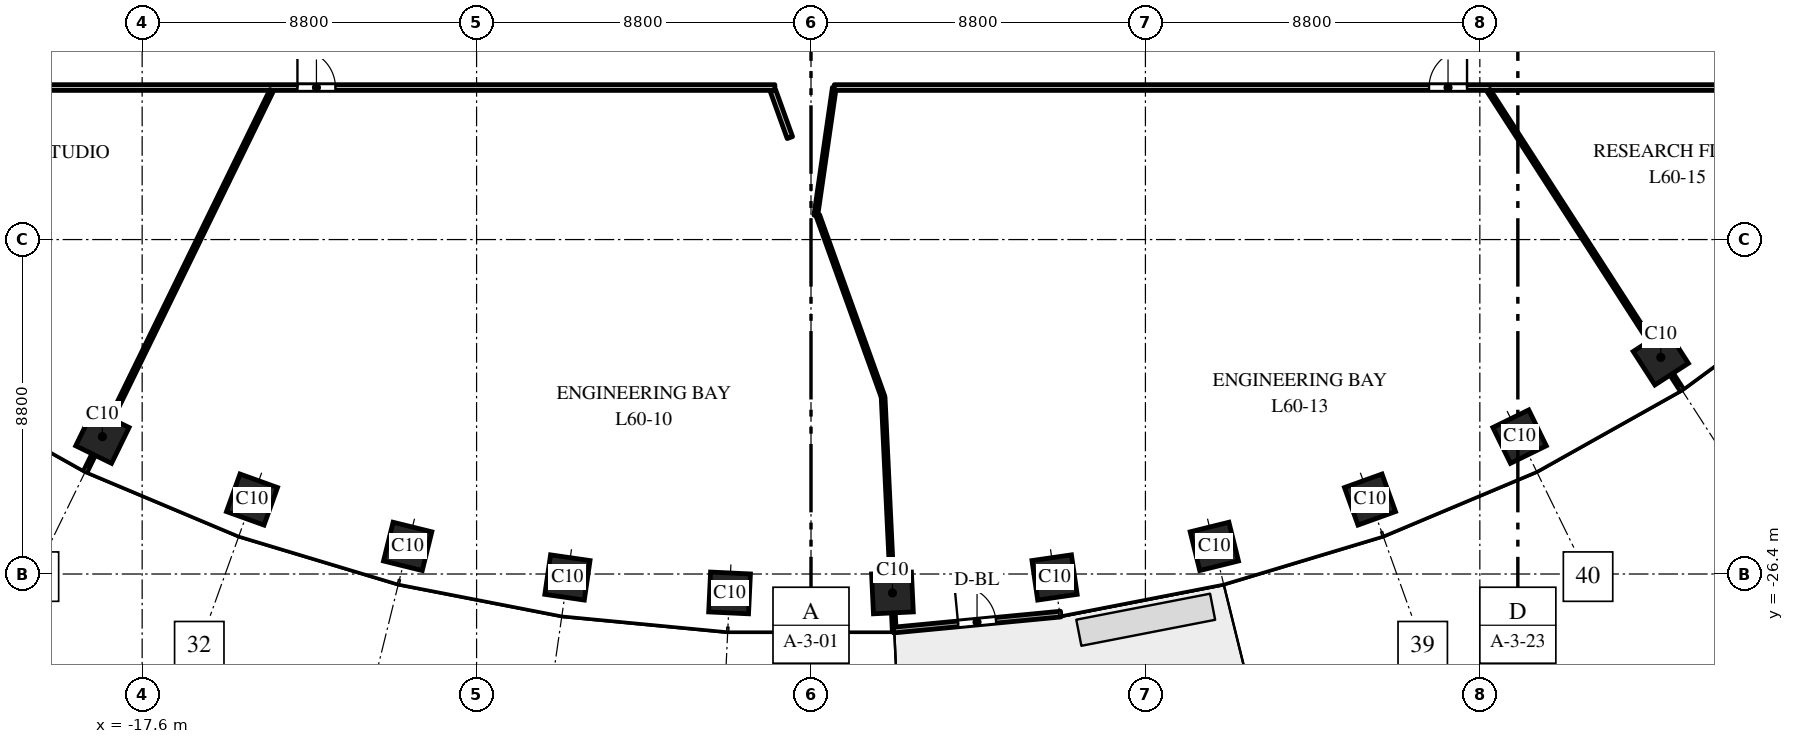
"""IFC4 building model, lengths in metres.
Left out: names, types, materials, properties, quantities, classifications, styles, units other than length and angle.
Written with IfcOpenShell. Run it as: python <this file> out.ifc"""

import sys

from ifc_helpers import new_model, si_unit, direction, frame, frame_2d, origin, origin_2d, place, context, subcontext, project, spatial, rectangle, extrude, element, fill, save


model = new_model("IFC4")
c1 = context("Model", 3, precision=1e-05, world=origin(), true_north=direction((0.0, 1.0)))
c2 = subcontext(c1, "Body", "Model", "MODEL_VIEW")
j1 = project(units=[si_unit("LENGTHUNIT", "METRE"), si_unit("PLANEANGLEUNIT", "RADIAN")], contexts=[c1])
p1 = place(None, origin())
s1 = spatial("IfcSite", under=j1, at=p1, CompositionType="ELEMENT")
p2 = place(p1, origin())
s2 = spatial("IfcBuilding", under=s1, at=p2, CompositionType="ELEMENT")
p3 = place(p2, frame((0.0, 0.0, 281.5)))
s3 = spatial("IfcBuildingStorey", under=s2, at=p3, CompositionType="ELEMENT", Elevation=281.5)
for number, where, z_axis, x_axis in (
    (1, (-18.646, -22.785, 0.0), (0.0, 0.0, 1.0), (0.898, -0.439, 0.0)),
    (2, (-14.709, -24.441, 0.0), (0.0, 0.0, 1.0), (0.941, -0.338, 0.0)),
    (3, (-10.613, -25.674, 0.0), (0.0, 0.0, 1.0), (0.971, -0.24, 0.0)),
    (4, (-6.409, -26.491, 0.0), (0.0, 0.0, 1.0), (0.99, -0.143, 0.0)),
    (5, (-2.143, -26.898, 0.0), (0.0, 0.0, 1.0), (0.999, -0.048, 0.0)),
    (6, (2.143, -26.898, 0.0), (0.0, 0.0, 1.0), (0.999, 0.048, 0.0)),
    (7, (6.409, -26.491, 0.0), (0.0, 0.0, 1.0), (0.99, 0.143, 0.0)),
    (8, (10.613, -25.674, 0.0), (0.0, 0.0, 1.0), (0.971, 0.24, 0.0)),
    (9, (14.709, -24.441, 0.0), (0.0, 0.0, 1.0), (0.941, 0.338, 0.0)),
    (10, (18.646, -22.785, 0.0), (0.0, 0.0, 1.0), (0.898, 0.439, 0.0)),
    (11, (22.362, -20.7, 0.0), (0.0, 0.0, 1.0), (0.84, 0.542, 0.0)),
):
    element("IfcColumn", number, at=place(p3, frame(where, z_axis=z_axis, x_axis=x_axis)), inside=s3, PredefinedType="COLUMN", context=c2, shape_type="SweptSolid", body=[
        extrude(rectangle(XDim=1.05, YDim=1.05, at=origin_2d()), origin(), (0.0, 0.0, 1.0), 4.0),
    ])
p4 = place(p3, frame((2.166, -27.875, 0.0), z_axis=(0.0, 0.0, 1.0), x_axis=(0.995473879823, 0.095035543824, 0.0)))
e12 = element("IfcWall", 12, at=p4, inside=s3, PredefinedType="STANDARD", context=c2, shape_type="SweptSolid", body=[
    extrude(rectangle(XDim=4.426, YDim=0.15, at=frame_2d((2.213, 0.0))), origin(), (0.0, 0.0, 1.0), 3.7),
])
p5 = place(p4, frame((1.713, 0.0, 0.0)))
e13 = element("IfcOpeningElement", 13, at=p5, cuts=e12, PredefinedType="OPENING", context=c2, shape_type="SweptSolid", body=[
    extrude(rectangle(XDim=1.0, YDim=2.4, at=frame_2d((0.5, 1.2))), frame((0.0, 0.085, 0.0), z_axis=(0.0, -1.0, 0.0), x_axis=(1.0, 0.0, 0.0)), (0.0, 0.0, 1.0), 0.17),
])
p6 = place(p3, frame((-24.0, -13.6, 0.0), z_axis=(0.0, 0.0, 1.0), x_axis=(1.0, 0.0, 0.0)))
e14 = element("IfcWall", 14, at=p6, inside=s3, PredefinedType="PARTITIONING", context=c2, shape_type="SweptSolid", body=[
    extrude(rectangle(XDim=23.05, YDim=0.15, at=frame_2d((11.525, 0.0))), origin(), (0.0, 0.0, 1.0), 2.75),
])
p7 = place(p6, frame((0.65, 0.0, 0.0)))
e15 = element("IfcOpeningElement", 15, at=p7, cuts=e14, PredefinedType="OPENING", context=c2, shape_type="SweptSolid", body=[
    extrude(rectangle(XDim=1.0, YDim=2.1, at=frame_2d((0.5, 1.05))), frame((0.0, 0.085, 0.0), z_axis=(0.0, -1.0, 0.0), x_axis=(1.0, 0.0, 0.0)), (0.0, 0.0, 1.0), 0.17),
])
p8 = place(p6, frame((10.486, 0.0, 0.0)))
e16 = element("IfcOpeningElement", 16, at=p8, cuts=e14, PredefinedType="OPENING", context=c2, shape_type="SweptSolid", body=[
    extrude(rectangle(XDim=1.0, YDim=2.1, at=frame_2d((0.5, 1.05))), frame((0.0, 0.085, 0.0), z_axis=(0.0, -1.0, 0.0), x_axis=(1.0, 0.0, 0.0)), (0.0, 0.0, 1.0), 0.17),
])
p9 = place(p3, frame((-19.086, -23.685, 0.0), z_axis=(0.0, 0.0, 1.0), x_axis=(0.439228995151, 0.898375138691, 0.0)))
e17 = element("IfcWall", 17, at=p9, inside=s3, PredefinedType="PARTITIONING", context=c2, shape_type="SweptSolid", body=[
    extrude(rectangle(XDim=11.142, YDim=0.1, at=frame_2d((5.571, 0.0))), origin(), (0.0, 0.0, 1.0), 2.85),
])
p10 = place(p3, frame((-1.002, -13.679, 0.0), z_axis=(0.0, 0.0, 1.0), x_axis=(0.338955963777, -0.94080223991, 0.0)))
e18 = element("IfcWall", 18, at=p10, inside=s3, PredefinedType="PARTITIONING", context=c2, shape_type="SweptSolid", body=[
    extrude(rectangle(XDim=1.316, YDim=0.15, at=frame_2d((0.658, 0.0))), origin(), (0.0, 0.0, 1.0), 2.85),
])
p11 = place(p3, frame((0.127, -16.965, 0.0), z_axis=(0.0, 0.0, 1.0), x_axis=(0.143132116572, 0.989703590579, 0.0)))
e19 = element("IfcWall", 19, at=p11, inside=s3, PredefinedType="PARTITIONING", context=c2, shape_type="SweptSolid", body=[
    extrude(rectangle(XDim=3.396, YDim=0.1, at=frame_2d((1.698, 0.0))), origin(), (0.0, 0.0, 1.0), 3.7),
])
p12 = place(p3, frame((0.178, -16.96, 0.0), z_axis=(0.0, 0.0, 1.0), x_axis=(0.338307223105, -0.941035718129, 0.0)))
e20 = element("IfcWall", 20, at=p12, inside=s3, PredefinedType="PARTITIONING", context=c2, shape_type="SweptSolid", body=[
    extrude(rectangle(XDim=5.075, YDim=0.1, at=frame_2d((2.538, 0.0))), origin(), (0.0, 0.0, 1.0), 3.7),
])
p13 = place(p3, frame((0.613, -13.6, 0.0), z_axis=(0.0, 0.0, 1.0), x_axis=(1.0, 0.0, 0.0)))
e21 = element("IfcWall", 21, at=p13, inside=s3, PredefinedType="PARTITIONING", context=c2, shape_type="SweptSolid", body=[
    extrude(rectangle(XDim=23.387, YDim=0.15, at=frame_2d((11.693, 0.0))), origin(), (0.0, 0.0, 1.0), 2.85),
])
p14 = place(p13, frame((15.65, 0.0, 0.0)))
e22 = element("IfcOpeningElement", 22, at=p14, cuts=e21, PredefinedType="OPENING", context=c2, shape_type="SweptSolid", body=[
    extrude(rectangle(XDim=1.0, YDim=2.1, at=frame_2d((0.5, 1.05))), frame((0.0, 0.085, 0.0), z_axis=(0.0, -1.0, 0.0), x_axis=(1.0, 0.0, 0.0)), (0.0, 0.0, 1.0), 0.17),
])
p15 = place(p3, frame((1.898, -21.75, 0.0), z_axis=(0.0, 0.0, 1.0), x_axis=(0.047440765919, -0.998874052986, 0.0)))
e23 = element("IfcWall", 23, at=p15, inside=s3, PredefinedType="PARTITIONING", context=c2, shape_type="SweptSolid", body=[
    extrude(rectangle(XDim=6.155, YDim=0.1, at=frame_2d((3.077, 0.0))), origin(), (0.0, 0.0, 1.0), 3.0),
])
p16 = place(p3, frame((17.828, -13.675, 0.0), z_axis=(0.0, 0.0, 1.0), x_axis=(0.542255150075, -0.840213872902, 0.0)))
e24 = element("IfcWall", 24, at=p16, inside=s3, PredefinedType="PARTITIONING", context=c2, shape_type="SweptSolid", body=[
    extrude(rectangle(XDim=9.363, YDim=0.1, at=frame_2d((4.682, 0.0))), origin(), (0.0, 0.0, 1.0), 3.7),
])
p17 = place(p5, origin())
e25 = element("IfcDoor", 25, at=p17, inside=s3, OperationType="SINGLE_SWING_LEFT", PredefinedType="DOOR", context=c2, shape_type="SweptSolid", body=[
    extrude(rectangle(XDim=1.0, YDim=2.4, at=frame_2d((0.5, 1.2))), frame((0.0, 0.025, 0.0), z_axis=(0.0, -1.0, 0.0), x_axis=(1.0, 0.0, 0.0)), (0.0, 0.0, 1.0), 0.05),
])
fill(e13, e25)
p18 = place(p8, origin())
e26 = element("IfcDoor", 26, at=p18, inside=s3, OperationType="SINGLE_SWING_LEFT", PredefinedType="DOOR", context=c2, shape_type="SweptSolid", body=[
    extrude(rectangle(XDim=1.0, YDim=2.1, at=frame_2d((0.5, 1.05))), frame((0.0, 0.025, 0.0), z_axis=(0.0, -1.0, 0.0), x_axis=(1.0, 0.0, 0.0)), (0.0, 0.0, 1.0), 0.05),
])
fill(e16, e26)
p19 = place(p14, origin())
e27 = element("IfcDoor", 27, at=p19, inside=s3, OperationType="SINGLE_SWING_RIGHT", PredefinedType="DOOR", context=c2, shape_type="SweptSolid", body=[
    extrude(rectangle(XDim=1.0, YDim=2.1, at=frame_2d((0.5, 1.05))), frame((0.0, 0.025, 0.0), z_axis=(0.0, -1.0, 0.0), x_axis=(1.0, 0.0, 0.0)), (0.0, 0.0, 1.0), 0.05),
])
fill(e22, e27)
save(model, sys.argv[1])
